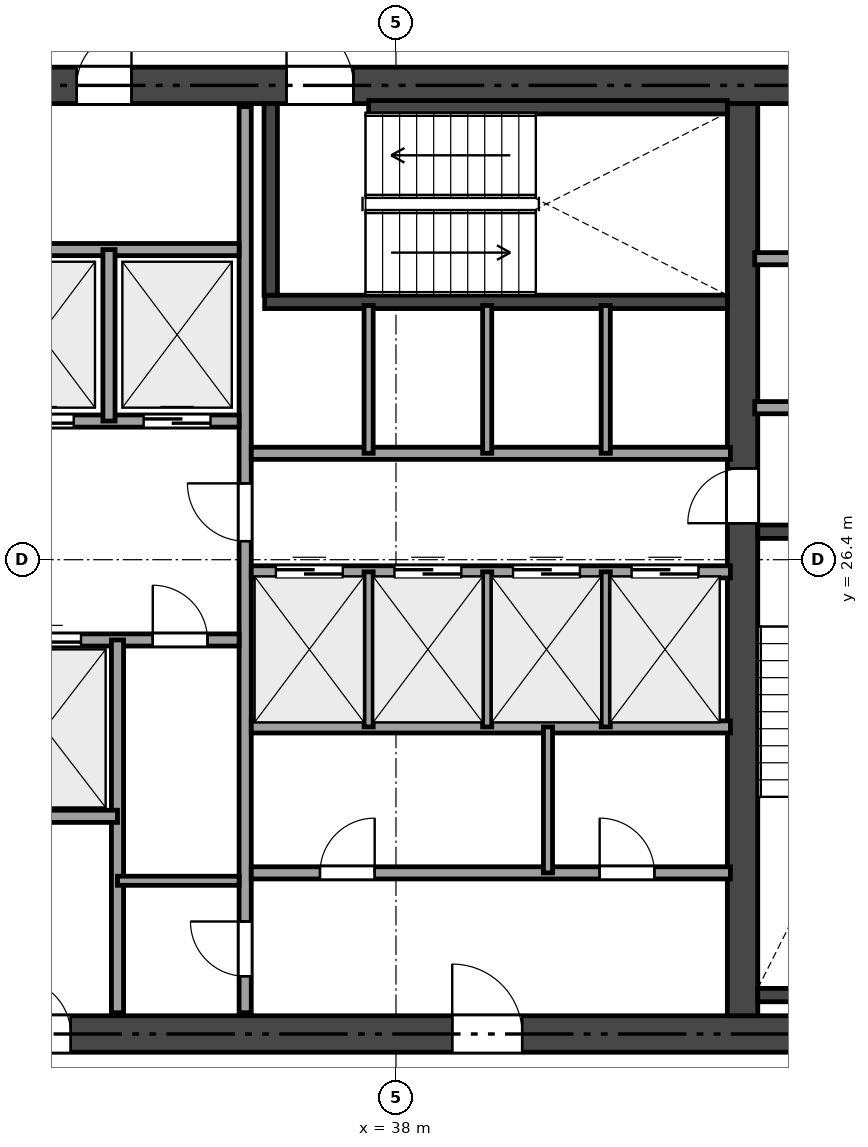
"""IFC4 building model, lengths in metres.
Left out: names, types, materials, properties, quantities, classifications, styles, units other than length and angle.
Written with IfcOpenShell. Run it as: python <this file> out.ifc"""

import sys

from ifc_helpers import new_model, si_unit, direction, frame, frame_2d, origin, place, context, subcontext, project, spatial, rectangle, extrude, element, fill, save


model = new_model("IFC4")
c1 = context("Model", 3, precision=1e-05, world=origin(), true_north=direction((0.0, 1.0)))
c2 = subcontext(c1, "Body", "Model", "MODEL_VIEW")
j1 = project(units=[si_unit("LENGTHUNIT", "METRE"), si_unit("PLANEANGLEUNIT", "RADIAN")], contexts=[c1])
p1 = place(None, origin())
s1 = spatial("IfcSite", under=j1, at=p1, CompositionType="ELEMENT")
p2 = place(p1, origin())
s2 = spatial("IfcBuilding", under=s1, at=p2, CompositionType="ELEMENT")
p3 = place(p2, frame((0.0, 0.0, 125.7)))
s3 = spatial("IfcBuildingStorey", under=s2, at=p3, CompositionType="ELEMENT", Elevation=125.7)
p4 = place(p3, frame((26.5, 18.6, 0.0), z_axis=(0.0, 0.0, 1.0), x_axis=(1.0, 0.0, 0.0)))
e1 = element("IfcWall", 1, at=p4, inside=s3, PredefinedType="SHEAR", context=c2, shape_type="SweptSolid", body=[
    extrude(rectangle(XDim=21.4, YDim=0.6, at=frame_2d((10.7, 0.0))), origin(), (0.0, 0.0, 1.0), 3.32),
])
p5 = place(p4, frame((12.425, 0.0, 0.0)))
e2 = element("IfcOpeningElement", 2, at=p5, cuts=e1, PredefinedType="OPENING", context=c2, shape_type="SweptSolid", body=[
    extrude(rectangle(XDim=1.15, YDim=2.15, at=frame_2d((0.575, 1.075))), frame((0.0, 0.31, 0.0), z_axis=(0.0, -1.0, 0.0), x_axis=(1.0, 0.0, 0.0)), (0.0, 0.0, 1.0), 0.62),
])
p6 = place(p4, frame((5.25, 0.0, 0.0)))
e3 = element("IfcOpeningElement", 3, at=p6, cuts=e1, PredefinedType="OPENING", context=c2, shape_type="SweptSolid", body=[
    extrude(rectangle(XDim=0.9, YDim=2.1, at=frame_2d((0.45, 1.05))), frame((0.0, 0.31, 0.0), z_axis=(0.0, -1.0, 0.0), x_axis=(1.0, 0.0, 0.0)), (0.0, 0.0, 1.0), 0.62),
])
p7 = place(p3, frame((26.5, 34.2, 0.0), z_axis=(0.0, 0.0, 1.0), x_axis=(1.0, 0.0, 0.0)))
e4 = element("IfcWall", 4, at=p7, inside=s3, PredefinedType="SHEAR", context=c2, shape_type="SweptSolid", body=[
    extrude(rectangle(XDim=21.4, YDim=0.6, at=frame_2d((10.7, 0.0))), origin(), (0.0, 0.0, 1.0), 3.32),
])
p8 = place(p7, frame((9.7, 0.0, 0.0)))
e5 = element("IfcOpeningElement", 5, at=p8, cuts=e4, PredefinedType="OPENING", context=c2, shape_type="SweptSolid", body=[
    extrude(rectangle(XDim=1.1, YDim=2.15, at=frame_2d((0.55, 1.075))), frame((0.0, 0.31, 0.0), z_axis=(0.0, -1.0, 0.0), x_axis=(1.0, 0.0, 0.0)), (0.0, 0.0, 1.0), 0.62),
])
p9 = place(p7, frame((1.95, 0.0, 0.0)))
e6 = element("IfcOpeningElement", 6, at=p9, cuts=e4, PredefinedType="OPENING", context=c2, shape_type="SweptSolid", body=[
    extrude(rectangle(XDim=0.9, YDim=2.1, at=frame_2d((0.45, 1.05))), frame((0.0, 0.31, 0.0), z_axis=(0.0, -1.0, 0.0), x_axis=(1.0, 0.0, 0.0)), (0.0, 0.0, 1.0), 0.62),
])
p10 = place(p7, frame((6.25, 0.0, 0.0)))
e7 = element("IfcOpeningElement", 7, at=p10, cuts=e4, PredefinedType="OPENING", context=c2, shape_type="SweptSolid", body=[
    extrude(rectangle(XDim=0.9, YDim=2.1, at=frame_2d((0.45, 1.05))), frame((0.0, 0.31, 0.0), z_axis=(0.0, -1.0, 0.0), x_axis=(1.0, 0.0, 0.0)), (0.0, 0.0, 1.0), 0.62),
])
p11 = place(p3, frame((43.7, 18.9, 0.0), z_axis=(0.0, 0.0, 1.0), x_axis=(0.0, 1.0, 0.0)))
e8 = element("IfcWall", 8, at=p11, inside=s3, PredefinedType="SHEAR", context=c2, shape_type="SweptSolid", body=[
    extrude(rectangle(XDim=15.0, YDim=0.5, at=frame_2d((7.5, 0.0))), origin(), (0.0, 0.0, 1.0), 3.32),
])
p12 = place(p11, frame((8.1, 0.0, 0.0)))
e9 = element("IfcOpeningElement", 9, at=p12, cuts=e8, PredefinedType="OPENING", context=c2, shape_type="SweptSolid", body=[
    extrude(rectangle(XDim=0.9, YDim=2.1, at=frame_2d((0.45, 1.05))), frame((0.0, 0.26, 0.0), z_axis=(0.0, -1.0, 0.0), x_axis=(1.0, 0.0, 0.0)), (0.0, 0.0, 1.0), 0.52),
])
for number, where, z_axis, x_axis in (
    (10, (43.95, 26.86, 0.0), (0.0, 0.0, 1.0), (1.0, 0.0, 0.0)),
    (11, (43.95, 19.24, 0.0), (0.0, 0.0, 1.0), (1.0, 0.0, 0.0)),
):
    element("IfcWall", number, at=place(p3, frame(where, z_axis=z_axis, x_axis=x_axis)), inside=s3, PredefinedType="SHEAR", context=c2, shape_type="SweptSolid", body=[
        extrude(rectangle(XDim=3.35, YDim=0.22, at=frame_2d((1.675, 0.0))), origin(), (0.0, 0.0, 1.0), 3.32),
    ])
p13 = place(p3, frame((35.84, 30.64, 0.0), z_axis=(0.0, 0.0, 1.0), x_axis=(1.0, 0.0, 0.0)))
e12 = element("IfcWall", 12, at=p13, inside=s3, PredefinedType="SHEAR", context=c2, shape_type="SweptSolid", body=[
    extrude(rectangle(XDim=7.61, YDim=0.22, at=frame_2d((3.805, 0.0))), origin(), (0.0, 0.0, 1.0), 3.32),
])
p14 = place(p3, frame((35.94, 30.75, 0.0), z_axis=(0.0, 0.0, 1.0), x_axis=(0.0, 1.0, 0.0)))
e13 = element("IfcWall", 13, at=p14, inside=s3, PredefinedType="SHEAR", context=c2, shape_type="SweptSolid", body=[
    extrude(rectangle(XDim=3.15, YDim=0.22, at=frame_2d((1.575, 0.0))), origin(), (0.0, 0.0, 1.0), 3.32),
])
p15 = place(p3, frame((37.55, 33.84, 0.0), z_axis=(0.0, 0.0, 1.0), x_axis=(1.0, 0.0, 0.0)))
e14 = element("IfcWall", 14, at=p15, inside=s3, PredefinedType="SHEAR", context=c2, shape_type="SweptSolid", body=[
    extrude(rectangle(XDim=5.9, YDim=0.22, at=frame_2d((2.95, 0.0))), origin(), (0.0, 0.0, 1.0), 3.32),
])
p16 = place(p3, frame((43.9, 28.9, 0.0), z_axis=(0.0, 0.0, 1.0), x_axis=(1.0, 0.0, 0.0)))
e15 = element("IfcWall", 15, at=p16, inside=s3, PredefinedType="SOLIDWALL", context=c2, shape_type="SweptSolid", body=[
    extrude(rectangle(XDim=3.35, YDim=0.2, at=frame_2d((1.675, 0.0))), origin(), (0.0, 0.0, 1.0), 3.32),
])
p17 = place(p16, frame((1.15, 0.0, 0.0)))
e16 = element("IfcOpeningElement", 16, at=p17, cuts=e15, PredefinedType="OPENING", context=c2, shape_type="SweptSolid", body=[
    extrude(rectangle(XDim=0.9, YDim=2.1, at=frame_2d((0.45, 1.05))), frame((0.0, 0.11, 0.0), z_axis=(0.0, -1.0, 0.0), x_axis=(1.0, 0.0, 0.0)), (0.0, 0.0, 1.0), 0.22),
])
p18 = place(p3, frame((43.9, 31.35, 0.0), z_axis=(0.0, 0.0, 1.0), x_axis=(1.0, 0.0, 0.0)))
e17 = element("IfcWall", 17, at=p18, inside=s3, PredefinedType="SOLIDWALL", context=c2, shape_type="SweptSolid", body=[
    extrude(rectangle(XDim=3.35, YDim=0.2, at=frame_2d((1.675, 0.0))), origin(), (0.0, 0.0, 1.0), 3.32),
])
p19 = place(p3, frame((35.52, 18.95, 0.0), z_axis=(0.0, 0.0, 1.0), x_axis=(0.0, 1.0, 0.0)))
e18 = element("IfcWall", 18, at=p19, inside=s3, PredefinedType="SOLIDWALL", context=c2, shape_type="SweptSolid", body=[
    extrude(rectangle(XDim=14.9, YDim=0.2, at=frame_2d((7.45, 0.0))), origin(), (0.0, 0.0, 1.0), 2.841),
])
p20 = place(p19, frame((7.755, 0.0, 0.0)))
e19 = element("IfcOpeningElement", 19, at=p20, cuts=e18, PredefinedType="OPENING", context=c2, shape_type="SweptSolid", body=[
    extrude(rectangle(XDim=0.95, YDim=2.15, at=frame_2d((0.475, 1.075))), frame((0.0, 0.11, 0.0), z_axis=(0.0, -1.0, 0.0), x_axis=(1.0, 0.0, 0.0)), (0.0, 0.0, 1.0), 0.22),
])
p21 = place(p19, frame((0.6, 0.0, 0.0)))
e20 = element("IfcOpeningElement", 20, at=p21, cuts=e18, PredefinedType="OPENING", context=c2, shape_type="SweptSolid", body=[
    extrude(rectangle(XDim=0.9, YDim=2.1, at=frame_2d((0.45, 1.05))), frame((0.0, 0.11, 0.0), z_axis=(0.0, -1.0, 0.0), x_axis=(1.0, 0.0, 0.0)), (0.0, 0.0, 1.0), 0.22),
])
p22 = place(p3, frame((31.0, 28.68, 0.0), z_axis=(0.0, 0.0, 1.0), x_axis=(1.0, 0.0, 0.0)))
e21 = element("IfcWall", 21, at=p22, inside=s3, PredefinedType="SOLIDWALL", context=c2, shape_type="SweptSolid", body=[
    extrude(rectangle(XDim=4.42, YDim=0.2, at=frame_2d((2.21, 0.0))), origin(), (0.0, 0.0, 1.0), 3.32),
])
p23 = place(p22, frame((0.6, 0.0, 0.0)))
e22 = element("IfcOpeningElement", 22, at=p23, cuts=e21, PredefinedType="OPENING", context=c2, shape_type="SweptSolid", body=[
    extrude(rectangle(XDim=1.1, YDim=2.15, at=frame_2d((0.55, 1.075))), frame((0.0, 0.11, 0.0), z_axis=(0.0, -1.0, 0.0), x_axis=(1.0, 0.0, 0.0)), (0.0, 0.0, 1.0), 0.22),
])
p24 = place(p22, frame((2.85, 0.0, 0.0)))
e23 = element("IfcOpeningElement", 23, at=p24, cuts=e21, PredefinedType="OPENING", context=c2, shape_type="SweptSolid", body=[
    extrude(rectangle(XDim=1.1, YDim=2.15, at=frame_2d((0.55, 1.075))), frame((0.0, 0.11, 0.0), z_axis=(0.0, -1.0, 0.0), x_axis=(1.0, 0.0, 0.0)), (0.0, 0.0, 1.0), 0.22),
])
p25 = place(p3, frame((31.0, 31.5, 0.0), z_axis=(0.0, 0.0, 1.0), x_axis=(1.0, 0.0, 0.0)))
e24 = element("IfcWall", 24, at=p25, inside=s3, PredefinedType="SOLIDWALL", context=c2, shape_type="SweptSolid", body=[
    extrude(rectangle(XDim=4.42, YDim=0.2, at=frame_2d((2.21, 0.0))), origin(), (0.0, 0.0, 1.0), 3.32),
])
p26 = place(p3, frame((33.28, 28.68, 0.0), z_axis=(0.0, 0.0, 1.0), x_axis=(0.0, 1.0, 0.0)))
e25 = element("IfcWall", 25, at=p26, inside=s3, PredefinedType="SOLIDWALL", context=c2, shape_type="SweptSolid", body=[
    extrude(rectangle(XDim=2.82, YDim=0.2, at=frame_2d((1.41, 0.0))), origin(), (0.0, 0.0, 1.0), 3.32),
])
p27 = place(p3, frame((31.0, 25.08, 0.0), z_axis=(0.0, 0.0, 1.0), x_axis=(1.0, 0.0, 0.0)))
e26 = element("IfcWall", 26, at=p27, inside=s3, PredefinedType="SOLIDWALL", context=c2, shape_type="SweptSolid", body=[
    extrude(rectangle(XDim=4.42, YDim=0.2, at=frame_2d((2.21, 0.0))), origin(), (0.0, 0.0, 1.0), 3.32),
])
p28 = place(p27, frame((3.0, 0.0, 0.0)))
e27 = element("IfcOpeningElement", 27, at=p28, cuts=e26, PredefinedType="OPENING", context=c2, shape_type="SweptSolid", body=[
    extrude(rectangle(XDim=0.9, YDim=2.1, at=frame_2d((0.45, 1.05))), frame((0.0, 0.11, 0.0), z_axis=(0.0, -1.0, 0.0), x_axis=(1.0, 0.0, 0.0)), (0.0, 0.0, 1.0), 0.22),
])
p29 = place(p27, frame((0.62, 0.0, 0.0)))
e28 = element("IfcOpeningElement", 28, at=p29, cuts=e26, PredefinedType="OPENING", context=c2, shape_type="SweptSolid", body=[
    extrude(rectangle(XDim=1.2, YDim=2.15, at=frame_2d((0.6, 1.075))), frame((0.0, 0.11, 0.0), z_axis=(0.0, -1.0, 0.0), x_axis=(1.0, 0.0, 0.0)), (0.0, 0.0, 1.0), 0.22),
])
p30 = place(p3, frame((33.42, 18.95, 0.0), z_axis=(0.0, 0.0, 1.0), x_axis=(0.0, 1.0, 0.0)))
e29 = element("IfcWall", 29, at=p30, inside=s3, PredefinedType="SOLIDWALL", context=c2, shape_type="SweptSolid", body=[
    extrude(rectangle(XDim=6.13, YDim=0.2, at=frame_2d((3.065, 0.0))), origin(), (0.0, 0.0, 1.0), 2.841),
])
p31 = place(p3, frame((31.0, 22.18, 0.0), z_axis=(0.0, 0.0, 1.0), x_axis=(1.0, 0.0, 0.0)))
e30 = element("IfcWall", 30, at=p31, inside=s3, PredefinedType="SOLIDWALL", context=c2, shape_type="SweptSolid", body=[
    extrude(rectangle(XDim=2.42, YDim=0.2, at=frame_2d((1.21, 0.0))), origin(), (0.0, 0.0, 1.0), 3.32),
])
p32 = place(p3, frame((33.42, 21.12, 0.0), z_axis=(0.0, 0.0, 1.0), x_axis=(1.0, 0.0, 0.0)))
e31 = element("IfcWall", 31, at=p32, inside=s3, PredefinedType="PARTITIONING", context=c2, shape_type="SweptSolid", body=[
    extrude(rectangle(XDim=2.0, YDim=0.15, at=frame_2d((1.0, 0.0))), origin(), (0.0, 0.0, 1.0), 3.32),
])
p33 = place(p3, frame((35.62, 28.15, 0.0), z_axis=(0.0, 0.0, 1.0), x_axis=(1.0, 0.0, 0.0)))
e32 = element("IfcWall", 32, at=p33, inside=s3, PredefinedType="SOLIDWALL", context=c2, shape_type="SweptSolid", body=[
    extrude(rectangle(XDim=7.88, YDim=0.2, at=frame_2d((3.94, 0.0))), origin(), (0.0, 0.0, 1.0), 3.32),
])
p34 = place(p3, frame((35.62, 26.2, 0.0), z_axis=(0.0, 0.0, 1.0), x_axis=(1.0, 0.0, 0.0)))
e33 = element("IfcWall", 33, at=p34, inside=s3, PredefinedType="SOLIDWALL", context=c2, shape_type="SweptSolid", body=[
    extrude(rectangle(XDim=7.88, YDim=0.2, at=frame_2d((3.94, 0.0))), origin(), (0.0, 0.0, 1.0), 3.32),
])
p35 = place(p34, frame((0.405, 0.0, 0.0)))
e34 = element("IfcOpeningElement", 34, at=p35, cuts=e33, PredefinedType="OPENING", context=c2, shape_type="SweptSolid", body=[
    extrude(rectangle(XDim=1.1, YDim=2.15, at=frame_2d((0.55, 1.075))), frame((0.0, 0.11, 0.0), z_axis=(0.0, -1.0, 0.0), x_axis=(1.0, 0.0, 0.0)), (0.0, 0.0, 1.0), 0.22),
])
p36 = place(p34, frame((2.355, 0.0, 0.0)))
e35 = element("IfcOpeningElement", 35, at=p36, cuts=e33, PredefinedType="OPENING", context=c2, shape_type="SweptSolid", body=[
    extrude(rectangle(XDim=1.1, YDim=2.15, at=frame_2d((0.55, 1.075))), frame((0.0, 0.11, 0.0), z_axis=(0.0, -1.0, 0.0), x_axis=(1.0, 0.0, 0.0)), (0.0, 0.0, 1.0), 0.22),
])
p37 = place(p34, frame((4.305, 0.0, 0.0)))
e36 = element("IfcOpeningElement", 36, at=p37, cuts=e33, PredefinedType="OPENING", context=c2, shape_type="SweptSolid", body=[
    extrude(rectangle(XDim=1.1, YDim=2.15, at=frame_2d((0.55, 1.075))), frame((0.0, 0.11, 0.0), z_axis=(0.0, -1.0, 0.0), x_axis=(1.0, 0.0, 0.0)), (0.0, 0.0, 1.0), 0.22),
])
p38 = place(p34, frame((6.255, 0.0, 0.0)))
e37 = element("IfcOpeningElement", 37, at=p38, cuts=e33, PredefinedType="OPENING", context=c2, shape_type="SweptSolid", body=[
    extrude(rectangle(XDim=1.1, YDim=2.15, at=frame_2d((0.55, 1.075))), frame((0.0, 0.11, 0.0), z_axis=(0.0, -1.0, 0.0), x_axis=(1.0, 0.0, 0.0)), (0.0, 0.0, 1.0), 0.22),
])
p39 = place(p3, frame((35.62, 23.65, 0.0), z_axis=(0.0, 0.0, 1.0), x_axis=(1.0, 0.0, 0.0)))
e38 = element("IfcWall", 38, at=p39, inside=s3, PredefinedType="SOLIDWALL", context=c2, shape_type="SweptSolid", body=[
    extrude(rectangle(XDim=7.88, YDim=0.2, at=frame_2d((3.94, 0.0))), origin(), (0.0, 0.0, 1.0), 2.841),
])
p40 = place(p3, frame((35.62, 21.25, 0.0), z_axis=(0.0, 0.0, 1.0), x_axis=(1.0, 0.0, 0.0)))
e39 = element("IfcWall", 39, at=p40, inside=s3, PredefinedType="SOLIDWALL", context=c2, shape_type="SweptSolid", body=[
    extrude(rectangle(XDim=7.88, YDim=0.2, at=frame_2d((3.94, 0.0))), origin(), (0.0, 0.0, 1.0), 3.32),
])
p41 = place(p40, frame((1.13, 0.0, 0.0)))
e40 = element("IfcOpeningElement", 40, at=p41, cuts=e39, PredefinedType="OPENING", context=c2, shape_type="SweptSolid", body=[
    extrude(rectangle(XDim=0.9, YDim=2.1, at=frame_2d((0.45, 1.05))), frame((0.0, 0.11, 0.0), z_axis=(0.0, -1.0, 0.0), x_axis=(1.0, 0.0, 0.0)), (0.0, 0.0, 1.0), 0.22),
])
p42 = place(p40, frame((5.73, 0.0, 0.0)))
e41 = element("IfcOpeningElement", 41, at=p42, cuts=e39, PredefinedType="OPENING", context=c2, shape_type="SweptSolid", body=[
    extrude(rectangle(XDim=0.9, YDim=2.1, at=frame_2d((0.45, 1.05))), frame((0.0, 0.11, 0.0), z_axis=(0.0, -1.0, 0.0), x_axis=(1.0, 0.0, 0.0)), (0.0, 0.0, 1.0), 0.22),
])
for number, where, z_axis, x_axis in (
    (42, (37.55, 28.15, 0.0), (0.0, 0.0, 1.0), (0.0, 1.0, 0.0)),
    (43, (39.5, 28.15, 0.0), (0.0, 0.0, 1.0), (0.0, 1.0, 0.0)),
    (44, (41.45, 28.15, 0.0), (0.0, 0.0, 1.0), (0.0, 1.0, 0.0)),
):
    element("IfcWall", number, at=place(p3, frame(where, z_axis=z_axis, x_axis=x_axis)), inside=s3, PredefinedType="PARTITIONING", context=c2, shape_type="SweptSolid", body=[
        extrude(rectangle(XDim=2.43, YDim=0.15, at=frame_2d((1.215, 0.0))), origin(), (0.0, 0.0, 1.0), 3.32),
    ])
for number, where, z_axis, x_axis in (
    (45, (37.55, 23.65, 0.0), (0.0, 0.0, 1.0), (0.0, 1.0, 0.0)),
    (46, (39.5, 23.65, 0.0), (0.0, 0.0, 1.0), (0.0, 1.0, 0.0)),
    (47, (41.45, 23.65, 0.0), (0.0, 0.0, 1.0), (0.0, 1.0, 0.0)),
):
    element("IfcWall", number, at=place(p3, frame(where, z_axis=z_axis, x_axis=x_axis)), inside=s3, PredefinedType="PARTITIONING", context=c2, shape_type="SweptSolid", body=[
        extrude(rectangle(XDim=2.55, YDim=0.15, at=frame_2d((1.275, 0.0))), origin(), (0.0, 0.0, 1.0), 2.841),
    ])
p43 = place(p3, frame((40.5, 21.25, 0.0), z_axis=(0.0, 0.0, 1.0), x_axis=(0.0, 1.0, 0.0)))
e48 = element("IfcWall", 48, at=p43, inside=s3, PredefinedType="PARTITIONING", context=c2, shape_type="SweptSolid", body=[
    extrude(rectangle(XDim=2.4, YDim=0.15, at=frame_2d((1.2, 0.0))), origin(), (0.0, 0.0, 1.0), 2.841),
])
p44 = place(p8, origin())
e49 = element("IfcDoor", 49, at=p44, inside=s3, OperationType="SINGLE_SWING_LEFT", PredefinedType="DOOR", context=c2, shape_type="SweptSolid", body=[
    extrude(rectangle(XDim=1.1, YDim=2.15, at=frame_2d((0.55, 1.075))), frame((0.0, 0.025, 0.0), z_axis=(0.0, -1.0, 0.0), x_axis=(1.0, 0.0, 0.0)), (0.0, 0.0, 1.0), 0.05),
])
fill(e5, e49)
p45 = place(p20, origin())
e50 = element("IfcDoor", 50, at=p45, inside=s3, OperationType="SINGLE_SWING_RIGHT", PredefinedType="DOOR", context=c2, shape_type="SweptSolid", body=[
    extrude(rectangle(XDim=0.95, YDim=2.15, at=frame_2d((0.475, 1.075))), frame((0.0, 0.025, 0.0), z_axis=(0.0, -1.0, 0.0), x_axis=(1.0, 0.0, 0.0)), (0.0, 0.0, 1.0), 0.05),
])
fill(e19, e50)
p46 = place(p12, origin())
e51 = element("IfcDoor", 51, at=p46, inside=s3, OperationType="SINGLE_SWING_LEFT", PredefinedType="DOOR", context=c2, shape_type="SweptSolid", body=[
    extrude(rectangle(XDim=0.9, YDim=2.1, at=frame_2d((0.45, 1.05))), frame((0.0, 0.025, 0.0), z_axis=(0.0, -1.0, 0.0), x_axis=(1.0, 0.0, 0.0)), (0.0, 0.0, 1.0), 0.05),
])
fill(e9, e51)
p47 = place(p5, origin())
e52 = element("IfcDoor", 52, at=p47, inside=s3, OperationType="SINGLE_SWING_LEFT", PredefinedType="DOOR", context=c2, shape_type="SweptSolid", body=[
    extrude(rectangle(XDim=1.15, YDim=2.15, at=frame_2d((0.575, 1.075))), frame((0.0, 0.025, 0.0), z_axis=(0.0, -1.0, 0.0), x_axis=(1.0, 0.0, 0.0)), (0.0, 0.0, 1.0), 0.05),
])
fill(e2, e52)
p48 = place(p10, origin())
e53 = element("IfcDoor", 53, at=p48, inside=s3, OperationType="SINGLE_SWING_RIGHT", PredefinedType="DOOR", context=c2, shape_type="SweptSolid", body=[
    extrude(rectangle(XDim=0.9, YDim=2.1, at=frame_2d((0.45, 1.05))), frame((0.0, 0.025, 0.0), z_axis=(0.0, -1.0, 0.0), x_axis=(1.0, 0.0, 0.0)), (0.0, 0.0, 1.0), 0.05),
])
fill(e7, e53)
p49 = place(p6, origin())
e54 = element("IfcDoor", 54, at=p49, inside=s3, OperationType="SINGLE_SWING_LEFT", PredefinedType="DOOR", context=c2, shape_type="SweptSolid", body=[
    extrude(rectangle(XDim=0.9, YDim=2.1, at=frame_2d((0.45, 1.05))), frame((0.0, 0.025, 0.0), z_axis=(0.0, -1.0, 0.0), x_axis=(1.0, 0.0, 0.0)), (0.0, 0.0, 1.0), 0.05),
])
fill(e3, e54)
p50 = place(p21, origin())
e55 = element("IfcDoor", 55, at=p50, inside=s3, OperationType="SINGLE_SWING_RIGHT", PredefinedType="DOOR", context=c2, shape_type="SweptSolid", body=[
    extrude(rectangle(XDim=0.9, YDim=2.1, at=frame_2d((0.45, 1.05))), frame((0.0, 0.025, 0.0), z_axis=(0.0, -1.0, 0.0), x_axis=(1.0, 0.0, 0.0)), (0.0, 0.0, 1.0), 0.05),
])
fill(e20, e55)
p51 = place(p28, origin())
e56 = element("IfcDoor", 56, at=p51, inside=s3, OperationType="SINGLE_SWING_LEFT", PredefinedType="DOOR", context=c2, shape_type="SweptSolid", body=[
    extrude(rectangle(XDim=0.9, YDim=2.1, at=frame_2d((0.45, 1.05))), frame((0.0, 0.025, 0.0), z_axis=(0.0, -1.0, 0.0), x_axis=(1.0, 0.0, 0.0)), (0.0, 0.0, 1.0), 0.05),
])
fill(e27, e56)
p52 = place(p41, origin())
e57 = element("IfcDoor", 57, at=p52, inside=s3, OperationType="SINGLE_SWING_RIGHT", PredefinedType="DOOR", context=c2, shape_type="SweptSolid", body=[
    extrude(rectangle(XDim=0.9, YDim=2.1, at=frame_2d((0.45, 1.05))), frame((0.0, 0.025, 0.0), z_axis=(0.0, -1.0, 0.0), x_axis=(1.0, 0.0, 0.0)), (0.0, 0.0, 1.0), 0.05),
])
fill(e40, e57)
p53 = place(p42, origin())
e58 = element("IfcDoor", 58, at=p53, inside=s3, OperationType="SINGLE_SWING_LEFT", PredefinedType="DOOR", context=c2, shape_type="SweptSolid", body=[
    extrude(rectangle(XDim=0.9, YDim=2.1, at=frame_2d((0.45, 1.05))), frame((0.0, 0.025, 0.0), z_axis=(0.0, -1.0, 0.0), x_axis=(1.0, 0.0, 0.0)), (0.0, 0.0, 1.0), 0.05),
])
fill(e41, e58)
p54 = place(p23, origin())
e59 = element("IfcDoor", 59, at=p54, inside=s3, OperationType="SLIDING_TO_LEFT", PredefinedType="DOOR", context=c2, shape_type="SweptSolid", body=[
    extrude(rectangle(XDim=1.1, YDim=2.15, at=frame_2d((0.55, 1.075))), frame((0.0, 0.025, 0.0), z_axis=(0.0, -1.0, 0.0), x_axis=(1.0, 0.0, 0.0)), (0.0, 0.0, 1.0), 0.05),
])
fill(e22, e59)
p55 = place(p24, origin())
e60 = element("IfcDoor", 60, at=p55, inside=s3, OperationType="SLIDING_TO_LEFT", PredefinedType="DOOR", context=c2, shape_type="SweptSolid", body=[
    extrude(rectangle(XDim=1.1, YDim=2.15, at=frame_2d((0.55, 1.075))), frame((0.0, 0.025, 0.0), z_axis=(0.0, -1.0, 0.0), x_axis=(1.0, 0.0, 0.0)), (0.0, 0.0, 1.0), 0.05),
])
fill(e23, e60)
p56 = place(p29, origin())
e61 = element("IfcDoor", 61, at=p56, inside=s3, OperationType="SLIDING_TO_LEFT", PredefinedType="DOOR", context=c2, shape_type="SweptSolid", body=[
    extrude(rectangle(XDim=1.2, YDim=2.15, at=frame_2d((0.6, 1.075))), frame((0.0, 0.025, 0.0), z_axis=(0.0, -1.0, 0.0), x_axis=(1.0, 0.0, 0.0)), (0.0, 0.0, 1.0), 0.05),
])
fill(e28, e61)
p57 = place(p35, origin())
e62 = element("IfcDoor", 62, at=p57, inside=s3, OperationType="SLIDING_TO_LEFT", PredefinedType="DOOR", context=c2, shape_type="SweptSolid", body=[
    extrude(rectangle(XDim=1.1, YDim=2.15, at=frame_2d((0.55, 1.075))), frame((0.0, 0.025, 0.0), z_axis=(0.0, -1.0, 0.0), x_axis=(1.0, 0.0, 0.0)), (0.0, 0.0, 1.0), 0.05),
])
fill(e34, e62)
p58 = place(p36, origin())
e63 = element("IfcDoor", 63, at=p58, inside=s3, OperationType="SLIDING_TO_LEFT", PredefinedType="DOOR", context=c2, shape_type="SweptSolid", body=[
    extrude(rectangle(XDim=1.1, YDim=2.15, at=frame_2d((0.55, 1.075))), frame((0.0, 0.025, 0.0), z_axis=(0.0, -1.0, 0.0), x_axis=(1.0, 0.0, 0.0)), (0.0, 0.0, 1.0), 0.05),
])
fill(e35, e63)
p59 = place(p37, origin())
e64 = element("IfcDoor", 64, at=p59, inside=s3, OperationType="SLIDING_TO_LEFT", PredefinedType="DOOR", context=c2, shape_type="SweptSolid", body=[
    extrude(rectangle(XDim=1.1, YDim=2.15, at=frame_2d((0.55, 1.075))), frame((0.0, 0.025, 0.0), z_axis=(0.0, -1.0, 0.0), x_axis=(1.0, 0.0, 0.0)), (0.0, 0.0, 1.0), 0.05),
])
fill(e36, e64)
p60 = place(p38, origin())
e65 = element("IfcDoor", 65, at=p60, inside=s3, OperationType="SLIDING_TO_LEFT", PredefinedType="DOOR", context=c2, shape_type="SweptSolid", body=[
    extrude(rectangle(XDim=1.1, YDim=2.15, at=frame_2d((0.55, 1.075))), frame((0.0, 0.025, 0.0), z_axis=(0.0, -1.0, 0.0), x_axis=(1.0, 0.0, 0.0)), (0.0, 0.0, 1.0), 0.05),
])
fill(e37, e65)
save(model, sys.argv[1])
